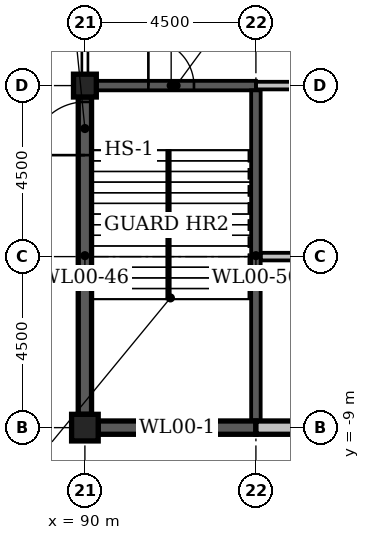
"""IFC4 building model, lengths in metres.
Left out: names, types, materials, properties, quantities, classifications, styles, units other than length and angle.
Written with IfcOpenShell. Run it as: python <this file> out.ifc"""

import sys

from ifc_helpers import new_model, si_unit, direction, frame, frame_2d, origin, origin_2d, place, context, subcontext, project, spatial, rectangle, extrude, element, fill, save


model = new_model("IFC4")
c1 = context("Model", 3, precision=1e-05, world=origin(), true_north=direction((0.0, 1.0)))
c2 = subcontext(c1, "Body", "Model", "MODEL_VIEW")
j1 = project(units=[si_unit("LENGTHUNIT", "METRE"), si_unit("PLANEANGLEUNIT", "RADIAN")], contexts=[c1])
p1 = place(None, origin())
s1 = spatial("IfcSite", under=j1, at=p1, CompositionType="ELEMENT")
p2 = place(p1, origin())
s2 = spatial("IfcBuilding", under=s1, at=p2, CompositionType="ELEMENT")
p3 = place(p2, origin())
s3 = spatial("IfcBuildingStorey", under=s2, at=p3, CompositionType="ELEMENT", Elevation=0.0)
p4 = place(p3, frame((90.0, -9.0, 0.0), z_axis=(0.0, 0.0, 1.0), x_axis=(1.0, 0.0, 0.0)))
e1 = element("IfcColumn", 1, at=p4, inside=s3, PredefinedType="COLUMN", context=c2, shape_type="SweptSolid", body=[
    extrude(rectangle(XDim=0.7, YDim=0.7, at=origin_2d()), origin(), (0.0, 0.0, 1.0), 8.7),
])
p5 = place(p3, frame((90.0, 0.0, 0.0), z_axis=(0.0, 0.0, 1.0), x_axis=(1.0, 0.0, 0.0)))
e2 = element("IfcColumn", 2, at=p5, inside=s3, PredefinedType="COLUMN", context=c2, shape_type="SweptSolid", body=[
    extrude(rectangle(XDim=0.6, YDim=0.6, at=origin_2d()), origin(), (0.0, 0.0, 1.0), 8.7),
])
p6 = place(p3, frame((90.35, -9.0, 0.0), z_axis=(0.0, 0.0, 1.0), x_axis=(1.0, 0.0, 0.0)))
e3 = element("IfcWall", 3, at=p6, inside=s3, PredefinedType="STANDARD", context=c2, shape_type="SweptSolid", body=[
    extrude(rectangle(XDim=4.15, YDim=0.35, at=frame_2d((2.075, 0.0))), origin(), (0.0, 0.0, 1.0), 9.0),
])
p7 = place(p3, frame((94.5, -9.0, 0.0), z_axis=(0.0, 0.0, 1.0), x_axis=(1.0, 0.0, 0.0)))
e4 = element("IfcWall", 4, at=p7, inside=s3, PredefinedType="STANDARD", context=c2, shape_type="SweptSolid", body=[
    extrude(rectangle(XDim=4.2, YDim=0.35, at=frame_2d((2.1, 0.0))), origin(), (0.0, 0.0, 1.0), 8.1),
])
p8 = place(p7, frame((1.05, 0.0, 1.2)))
e5 = element("IfcOpeningElement", 5, at=p8, cuts=e4, PredefinedType="OPENING", context=c2, shape_type="SweptSolid", body=[
    extrude(rectangle(XDim=2.1, YDim=2.4, at=frame_2d((1.05, 1.2))), frame((0.0, 0.187, 0.0), z_axis=(0.0, -1.0, 0.0), x_axis=(1.0, 0.0, 0.0)), (0.0, 0.0, 1.0), 0.374),
])
p9 = place(p3, frame((94.625, -4.5, 0.0), z_axis=(0.0, 0.0, 1.0), x_axis=(1.0, 0.0, 0.0)))
e6 = element("IfcWall", 6, at=p9, inside=s3, PredefinedType="STANDARD", context=c2, shape_type="SweptSolid", body=[
    extrude(rectangle(XDim=44.875, YDim=0.2, at=frame_2d((22.438, 0.0))), origin(), (0.0, 0.0, 1.0), 8.7),
])
p10 = place(p9, frame((3.42, 0.0, 0.0)))
e7 = element("IfcOpeningElement", 7, at=p10, cuts=e6, PredefinedType="OPENING", context=c2, shape_type="SweptSolid", body=[
    extrude(rectangle(XDim=1.0, YDim=2.1, at=frame_2d((0.5, 1.05))), frame((0.0, 0.112, 0.0), z_axis=(0.0, -1.0, 0.0), x_axis=(1.0, 0.0, 0.0)), (0.0, 0.0, 1.0), 0.224),
])
p11 = place(p9, frame((10.17, 0.0, 0.0)))
e8 = element("IfcOpeningElement", 8, at=p11, cuts=e6, PredefinedType="OPENING", context=c2, shape_type="SweptSolid", body=[
    extrude(rectangle(XDim=1.0, YDim=2.1, at=frame_2d((0.5, 1.05))), frame((0.0, 0.112, 0.0), z_axis=(0.0, -1.0, 0.0), x_axis=(1.0, 0.0, 0.0)), (0.0, 0.0, 1.0), 0.224),
])
p12 = place(p9, frame((17.17, 0.0, 0.0)))
e9 = element("IfcOpeningElement", 9, at=p12, cuts=e6, PredefinedType="OPENING", context=c2, shape_type="SweptSolid", body=[
    extrude(rectangle(XDim=1.0, YDim=2.1, at=frame_2d((0.5, 1.05))), frame((0.0, 0.112, 0.0), z_axis=(0.0, -1.0, 0.0), x_axis=(1.0, 0.0, 0.0)), (0.0, 0.0, 1.0), 0.224),
])
p13 = place(p9, frame((24.82, 0.0, 0.0)))
e10 = element("IfcOpeningElement", 10, at=p13, cuts=e6, PredefinedType="OPENING", context=c2, shape_type="SweptSolid", body=[
    extrude(rectangle(XDim=1.0, YDim=2.1, at=frame_2d((0.5, 1.05))), frame((0.0, 0.112, 0.0), z_axis=(0.0, -1.0, 0.0), x_axis=(1.0, 0.0, 0.0)), (0.0, 0.0, 1.0), 0.224),
])
p14 = place(p9, frame((29.37, 0.0, 0.0)))
e11 = element("IfcOpeningElement", 11, at=p14, cuts=e6, PredefinedType="OPENING", context=c2, shape_type="SweptSolid", body=[
    extrude(rectangle(XDim=1.0, YDim=2.1, at=frame_2d((0.5, 1.05))), frame((0.0, 0.112, 0.0), z_axis=(0.0, -1.0, 0.0), x_axis=(1.0, 0.0, 0.0)), (0.0, 0.0, 1.0), 0.224),
])
p15 = place(p9, frame((33.87, 0.0, 0.0)))
e12 = element("IfcOpeningElement", 12, at=p15, cuts=e6, PredefinedType="OPENING", context=c2, shape_type="SweptSolid", body=[
    extrude(rectangle(XDim=1.0, YDim=2.1, at=frame_2d((0.5, 1.05))), frame((0.0, 0.112, 0.0), z_axis=(0.0, -1.0, 0.0), x_axis=(1.0, 0.0, 0.0)), (0.0, 0.0, 1.0), 0.224),
])
p16 = place(p9, frame((38.52, 0.0, 0.0)))
e13 = element("IfcOpeningElement", 13, at=p16, cuts=e6, PredefinedType="OPENING", context=c2, shape_type="SweptSolid", body=[
    extrude(rectangle(XDim=1.0, YDim=2.1, at=frame_2d((0.5, 1.05))), frame((0.0, 0.112, 0.0), z_axis=(0.0, -1.0, 0.0), x_axis=(1.0, 0.0, 0.0)), (0.0, 0.0, 1.0), 0.224),
])
p17 = place(p3, frame((90.3, 0.0, 0.0), z_axis=(0.0, 0.0, 1.0), x_axis=(1.0, 0.0, 0.0)))
e14 = element("IfcWall", 14, at=p17, inside=s3, PredefinedType="STANDARD", context=c2, shape_type="SweptSolid", body=[
    extrude(rectangle(XDim=4.2, YDim=0.25, at=frame_2d((2.1, 0.0))), origin(), (0.0, 0.0, 1.0), 9.0),
])
p18 = place(p17, frame((1.37, 0.0, 0.0)))
e15 = element("IfcOpeningElement", 15, at=p18, cuts=e14, PredefinedType="OPENING", context=c2, shape_type="SweptSolid", body=[
    extrude(rectangle(XDim=1.2, YDim=2.1, at=frame_2d((0.6, 1.05))), frame((0.0, 0.137, 0.0), z_axis=(0.0, -1.0, 0.0), x_axis=(1.0, 0.0, 0.0)), (0.0, 0.0, 1.0), 0.274),
])
p19 = place(p3, frame((94.5, 0.0, 0.0), z_axis=(0.0, 0.0, 1.0), x_axis=(1.0, 0.0, 0.0)))
e16 = element("IfcWall", 16, at=p19, inside=s3, PredefinedType="STANDARD", context=c2, shape_type="SweptSolid", body=[
    extrude(rectangle(XDim=4.2, YDim=0.2, at=frame_2d((2.1, 0.0))), origin(), (0.0, 0.0, 1.0), 8.7),
])
p20 = place(p3, frame((90.0, -8.65, 0.0), z_axis=(0.0, 0.0, 1.0), x_axis=(0.0, 1.0, 0.0)))
e17 = element("IfcWall", 17, at=p20, inside=s3, PredefinedType="STANDARD", context=c2, shape_type="SweptSolid", body=[
    extrude(rectangle(XDim=8.35, YDim=0.35, at=frame_2d((4.175, 0.0))), origin(), (0.0, 0.0, 1.0), 9.0),
])
p21 = place(p20, frame((6.82, 0.0, 0.0)))
e18 = element("IfcOpeningElement", 18, at=p21, cuts=e17, PredefinedType="OPENING", context=c2, shape_type="SweptSolid", body=[
    extrude(rectangle(XDim=1.4, YDim=2.1, at=frame_2d((0.7, 1.05))), frame((0.0, 0.187, 0.0), z_axis=(0.0, -1.0, 0.0), x_axis=(1.0, 0.0, 0.0)), (0.0, 0.0, 1.0), 0.374),
])
p22 = place(p3, frame((94.5, -8.825, 0.0), z_axis=(0.0, 0.0, 1.0), x_axis=(0.0, 1.0, 0.0)))
e19 = element("IfcWall", 19, at=p22, inside=s3, PredefinedType="STANDARD", context=c2, shape_type="SweptSolid", body=[
    extrude(rectangle(XDim=8.7, YDim=0.25, at=frame_2d((4.35, 0.0))), origin(), (0.0, 0.0, 1.0), 9.0),
])
p23 = place(p21, origin())
e20 = element("IfcDoor", 20, at=p23, inside=s3, OperationType="DOUBLE_DOOR_SINGLE_SWING", PredefinedType="DOOR", context=c2, shape_type="SweptSolid", body=[
    extrude(rectangle(XDim=1.4, YDim=2.1, at=frame_2d((0.7, 1.05))), frame((0.0, 0.025, 0.0), z_axis=(0.0, -1.0, 0.0), x_axis=(1.0, 0.0, 0.0)), (0.0, 0.0, 1.0), 0.05),
])
fill(e18, e20)
p24 = place(p18, origin())
e21 = element("IfcDoor", 21, at=p24, inside=s3, OperationType="SINGLE_SWING_LEFT", PredefinedType="DOOR", context=c2, shape_type="SweptSolid", body=[
    extrude(rectangle(XDim=1.2, YDim=2.1, at=frame_2d((0.6, 1.05))), frame((0.0, 0.025, 0.0), z_axis=(0.0, -1.0, 0.0), x_axis=(1.0, 0.0, 0.0)), (0.0, 0.0, 1.0), 0.05),
])
fill(e15, e21)
save(model, sys.argv[1])
